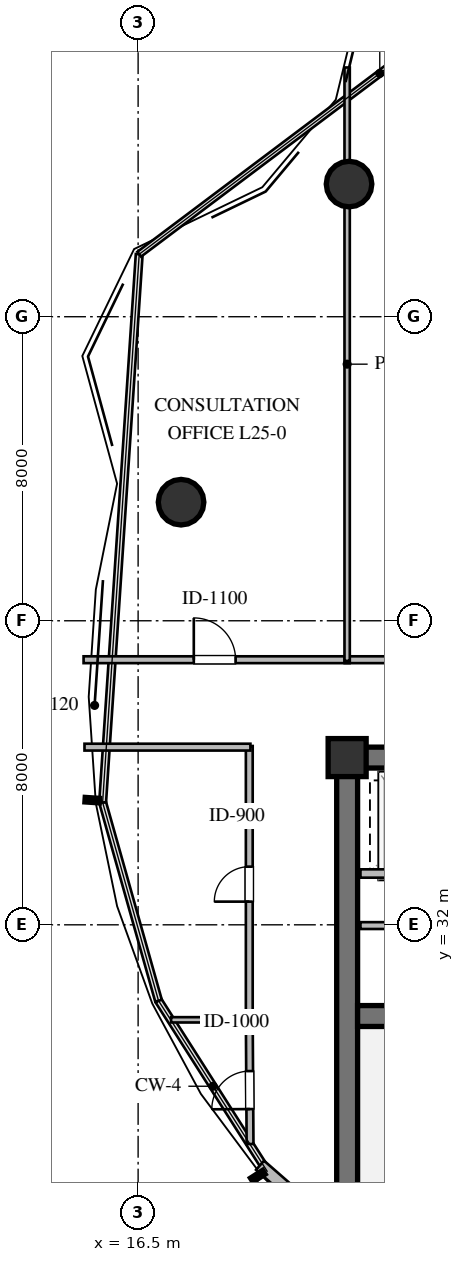
"""IFC4 building model, lengths in metres.
Left out: names, types, materials, properties, quantities, classifications, styles, units other than length and angle.
Written with IfcOpenShell. Run it as: python <this file> out.ifc"""

import sys

from ifc_helpers import new_model, si_unit, direction, frame, frame_2d, origin, origin_2d, place, context, subcontext, project, spatial, rectangle, circle, extrude, element, fill, save


model = new_model("IFC4")
c1 = context("Model", 3, precision=1e-05, world=origin(), true_north=direction((0.0, 1.0)))
c2 = subcontext(c1, "Body", "Model", "MODEL_VIEW")
j1 = project(units=[si_unit("LENGTHUNIT", "METRE"), si_unit("PLANEANGLEUNIT", "RADIAN")], contexts=[c1])
p1 = place(None, origin())
s1 = spatial("IfcSite", under=j1, at=p1, CompositionType="ELEMENT")
p2 = place(p1, origin())
s2 = spatial("IfcBuilding", under=s1, at=p2, CompositionType="ELEMENT")
p3 = place(p2, frame((0.0, 0.0, 97.8)))
s3 = spatial("IfcBuildingStorey", under=s2, at=p3, CompositionType="ELEMENT", Elevation=97.8)
p4 = place(p3, frame((21.725, 36.4, 0.0), z_axis=(0.0, 0.0, 1.0), x_axis=(1.0, 0.0, 0.0)))
e1 = element("IfcWall", 1, at=p4, inside=s3, PredefinedType="SHEAR", context=c2, shape_type="SweptSolid", body=[
    extrude(rectangle(XDim=22.55, YDim=0.55, at=frame_2d((11.275, 0.0))), origin(), (0.0, 0.0, 1.0), 4.56),
])
p5 = place(p3, frame((22.0, 23.875, 0.0), z_axis=(0.0, 0.0, 1.0), x_axis=(0.0, 1.0, 0.0)))
e2 = element("IfcWall", 2, at=p5, inside=s3, PredefinedType="SHEAR", context=c2, shape_type="SweptSolid", body=[
    extrude(rectangle(XDim=12.25, YDim=0.55, at=frame_2d((6.125, 0.0))), origin(), (0.0, 0.0, 1.0), 4.56),
])
p6 = place(p3, frame((22.275, 29.6, 0.0), z_axis=(0.0, 0.0, 1.0), x_axis=(1.0, 0.0, 0.0)))
e3 = element("IfcWall", 3, at=p6, inside=s3, PredefinedType="SHEAR", context=c2, shape_type="SweptSolid", body=[
    extrude(rectangle(XDim=21.45, YDim=0.55, at=frame_2d((10.725, 0.0))), origin(), (0.0, 0.0, 1.0), 4.56),
])
p7 = place(p6, frame((12.175, 0.0, 0.0)))
e4 = element("IfcOpeningElement", 4, at=p7, cuts=e3, PredefinedType="OPENING", context=c2, shape_type="SweptSolid", body=[
    extrude(rectangle(XDim=1.15, YDim=2.1, at=frame_2d((0.575, 1.05))), frame((0.0, 0.285, 0.0), z_axis=(0.0, -1.0, 0.0), x_axis=(1.0, 0.0, 0.0)), (0.0, 0.0, 1.0), 0.57),
])
p8 = place(p3, frame((22.0, 36.4, 0.0), z_axis=(0.0, 0.0, 1.0), x_axis=(1.0, 0.0, 0.0)))
e5 = element("IfcColumn", 5, at=p8, inside=s3, PredefinedType="COLUMN", context=c2, shape_type="SweptSolid", body=[
    extrude(rectangle(XDim=1.0, YDim=1.0, at=origin_2d()), origin(), (0.0, 0.0, 1.0), 4.8),
])
for number, where, z_axis, x_axis in (
    (6, (22.05, 51.49, -0.32), (0.0, 0.0, 1.0), (1.0, 0.0, 0.0)),
    (7, (17.63, 43.12, -0.32), (0.0, 0.0, 1.0), (1.0, 0.0, 0.0)),
):
    element("IfcColumn", number, at=place(p3, frame(where, z_axis=z_axis, x_axis=x_axis)), inside=s3, PredefinedType="COLUMN", context=c2, shape_type="SweptSolid", body=[
        extrude(circle(Radius=0.6, at=origin_2d()), origin(), (0.0, 0.0, 1.0), 5.12),
    ])
p9 = place(p3, frame((24.225, 21.727, 0.0), z_axis=(0.0, 0.0, 1.0), x_axis=(-0.753105964003, 0.657899237713, 0.0)))
e8 = element("IfcWall", 8, at=p9, inside=s3, PredefinedType="STANDARD", context=c2, shape_type="SweptSolid", body=[
    extrude(rectangle(XDim=5.998, YDim=0.32, at=frame_2d((2.999, 0.0))), origin(), (0.0, 0.0, 1.0), 2.35),
])
p10 = place(p3, frame((22.35, 33.35, 0.0), z_axis=(0.0, 0.0, 1.0), x_axis=(1.0, 0.0, 0.0)))
e9 = element("IfcWall", 9, at=p10, inside=s3, PredefinedType="SOLIDWALL", context=c2, shape_type="SweptSolid", body=[
    extrude(rectangle(XDim=3.57, YDim=0.22, at=frame_2d((1.785, 0.0))), origin(), (0.0, 0.0, 1.0), 4.56),
])
p11 = place(p10, frame((2.213, 0.0, 0.0)))
e10 = element("IfcOpeningElement", 10, at=p11, cuts=e9, PredefinedType="OPENING", context=c2, shape_type="SweptSolid", body=[
    extrude(rectangle(XDim=1.2, YDim=2.1, at=frame_2d((0.6, 1.05))), frame((0.0, 0.12, 0.0), z_axis=(0.0, -1.0, 0.0), x_axis=(1.0, 0.0, 0.0)), (0.0, 0.0, 1.0), 0.24),
])
p12 = place(p3, frame((22.35, 31.98, 0.0), z_axis=(0.0, 0.0, 1.0), x_axis=(1.0, 0.0, 0.0)))
e11 = element("IfcWall", 11, at=p12, inside=s3, PredefinedType="PARTITIONING", context=c2, shape_type="SweptSolid", body=[
    extrude(rectangle(XDim=3.75, YDim=0.18, at=frame_2d((1.875, 0.0))), origin(), (0.0, 0.0, 1.0), 4.56),
])
p13 = place(p12, frame((1.425, 0.0, 0.0)))
e12 = element("IfcOpeningElement", 12, at=p13, cuts=e11, PredefinedType="OPENING", context=c2, shape_type="SweptSolid", body=[
    extrude(rectangle(XDim=0.92, YDim=2.1, at=frame_2d((0.46, 1.05))), frame((0.0, 0.1, 0.0), z_axis=(0.0, -1.0, 0.0), x_axis=(1.0, 0.0, 0.0)), (0.0, 0.0, 1.0), 0.2),
])
p14 = place(p3, frame((15.065, 38.975, 0.0), z_axis=(0.0, 0.0, 1.0), x_axis=(1.0, 0.0, 0.0)))
e13 = element("IfcWall", 13, at=p14, inside=s3, PredefinedType="PARTITIONING", context=c2, shape_type="SweptSolid", body=[
    extrude(rectangle(XDim=7.0, YDim=0.18, at=frame_2d((3.5, 0.0))), origin(), (0.0, 0.0, 1.0), 4.56),
])
p15 = place(p14, frame((2.9, 0.0, 0.0)))
e14 = element("IfcOpeningElement", 14, at=p15, cuts=e13, PredefinedType="OPENING", context=c2, shape_type="SweptSolid", body=[
    extrude(rectangle(XDim=1.1, YDim=2.1, at=frame_2d((0.55, 1.05))), frame((0.0, 0.1, 0.0), z_axis=(0.0, -1.0, 0.0), x_axis=(1.0, 0.0, 0.0)), (0.0, 0.0, 1.0), 0.2),
])
p16 = place(p3, frame((21.935, 38.975, 0.0), z_axis=(0.0, 0.0, 1.0), x_axis=(1.0, 0.0, 0.0)))
e15 = element("IfcWall", 15, at=p16, inside=s3, PredefinedType="PARTITIONING", context=c2, shape_type="SweptSolid", body=[
    extrude(rectangle(XDim=13.13, YDim=0.18, at=frame_2d((6.565, 0.0))), origin(), (0.0, 0.0, 1.0), 4.56),
])
p17 = place(p16, frame((5.965, 0.0, 0.0)))
e16 = element("IfcOpeningElement", 16, at=p17, cuts=e15, PredefinedType="OPENING", context=c2, shape_type="SweptSolid", body=[
    extrude(rectangle(XDim=1.4, YDim=2.15, at=frame_2d((0.7, 1.075))), frame((0.0, 0.1, 0.0), z_axis=(0.0, -1.0, 0.0), x_axis=(1.0, 0.0, 0.0)), (0.0, 0.0, 1.0), 0.2),
])
p18 = place(p3, frame((19.425, 29.435, 0.0), z_axis=(0.0, 0.0, 1.0), x_axis=(0.0, 1.0, 0.0)))
e17 = element("IfcWall", 17, at=p18, inside=s3, PredefinedType="PARTITIONING", context=c2, shape_type="SweptSolid", body=[
    extrude(rectangle(XDim=7.27, YDim=0.18, at=frame_2d((3.635, 0.0))), origin(), (0.0, 0.0, 1.0), 3.857),
])
p19 = place(p18, frame((3.175, 0.0, 0.0)))
e18 = element("IfcOpeningElement", 18, at=p19, cuts=e17, PredefinedType="OPENING", context=c2, shape_type="SweptSolid", body=[
    extrude(rectangle(XDim=0.92, YDim=2.1, at=frame_2d((0.46, 1.05))), frame((0.0, 0.1, 0.0), z_axis=(0.0, -1.0, 0.0), x_axis=(1.0, 0.0, 0.0)), (0.0, 0.0, 1.0), 0.2),
])
p20 = place(p3, frame((19.455, 36.675, 0.0), z_axis=(0.0, 0.0, 1.0), x_axis=(-1.0, 0.0, 0.0)))
e19 = element("IfcWall", 19, at=p20, inside=s3, PredefinedType="PARTITIONING", context=c2, shape_type="SweptSolid", body=[
    extrude(rectangle(XDim=4.366, YDim=0.18, at=frame_2d((2.183, 0.0))), origin(), (0.0, 0.0, 1.0), 4.56),
])
p21 = place(p3, frame((19.445, 26.232, 0.0), z_axis=(0.0, 0.0, 1.0), x_axis=(-0.006007217614, 0.999981956505, 0.0)))
e20 = element("IfcWall", 20, at=p21, inside=s3, PredefinedType="PARTITIONING", context=c2, shape_type="SweptSolid", body=[
    extrude(rectangle(XDim=3.333, YDim=0.18, at=frame_2d((1.666, 0.0))), origin(), (0.0, 0.0, 1.0), 4.56),
])
p22 = place(p21, frame((0.919, 0.0, 0.0)))
e21 = element("IfcOpeningElement", 21, at=p22, cuts=e20, PredefinedType="OPENING", context=c2, shape_type="SweptSolid", body=[
    extrude(rectangle(XDim=1.0, YDim=2.1, at=frame_2d((0.5, 1.05))), frame((0.0, 0.1, 0.0), z_axis=(0.0, -1.0, 0.0), x_axis=(1.0, 0.0, 0.0)), (0.0, 0.0, 1.0), 0.2),
])
p23 = place(p3, frame((22.0, 54.558, 0.0), z_axis=(0.0, 0.0, 1.0), x_axis=(0.0, -1.0, 0.0)))
e22 = element("IfcWall", 22, at=p23, inside=s3, PredefinedType="PARTITIONING", context=c2, shape_type="SweptSolid", body=[
    extrude(rectangle(XDim=15.613, YDim=0.14, at=frame_2d((7.807, 0.0))), origin(), (0.0, 0.0, 1.0), 4.09),
])
p24 = place(p3, frame((19.455, 29.5, 0.0), z_axis=(0.0, 0.0, 1.0), x_axis=(-1.0, 0.0, 0.0)))
e23 = element("IfcWall", 23, at=p24, inside=s3, PredefinedType="PARTITIONING", context=c2, shape_type="SweptSolid", body=[
    extrude(rectangle(XDim=2.088, YDim=0.14, at=frame_2d((1.044, 0.0))), origin(), (0.0, 0.0, 1.0), 4.56),
])
p25 = place(p15, origin())
e24 = element("IfcDoor", 24, at=p25, inside=s3, OperationType="SINGLE_SWING_LEFT", PredefinedType="DOOR", context=c2, shape_type="SweptSolid", body=[
    extrude(rectangle(XDim=1.1, YDim=2.1, at=frame_2d((0.55, 1.05))), frame((0.0, 0.025, 0.0), z_axis=(0.0, -1.0, 0.0), x_axis=(1.0, 0.0, 0.0)), (0.0, 0.0, 1.0), 0.05),
])
fill(e14, e24)
p26 = place(p19, origin())
e25 = element("IfcDoor", 25, at=p26, inside=s3, OperationType="SINGLE_SWING_LEFT", PredefinedType="DOOR", context=c2, shape_type="SweptSolid", body=[
    extrude(rectangle(XDim=0.92, YDim=2.1, at=frame_2d((0.46, 1.05))), frame((0.0, 0.025, 0.0), z_axis=(0.0, -1.0, 0.0), x_axis=(1.0, 0.0, 0.0)), (0.0, 0.0, 1.0), 0.05),
])
fill(e18, e25)
p27 = place(p22, origin())
e26 = element("IfcDoor", 26, at=p27, inside=s3, OperationType="SINGLE_SWING_LEFT", PredefinedType="DOOR", context=c2, shape_type="SweptSolid", body=[
    extrude(rectangle(XDim=1.0, YDim=2.1, at=frame_2d((0.5, 1.05))), frame((0.0, 0.025, 0.0), z_axis=(0.0, -1.0, 0.0), x_axis=(1.0, 0.0, 0.0)), (0.0, 0.0, 1.0), 0.05),
])
fill(e21, e26)
save(model, sys.argv[1])
